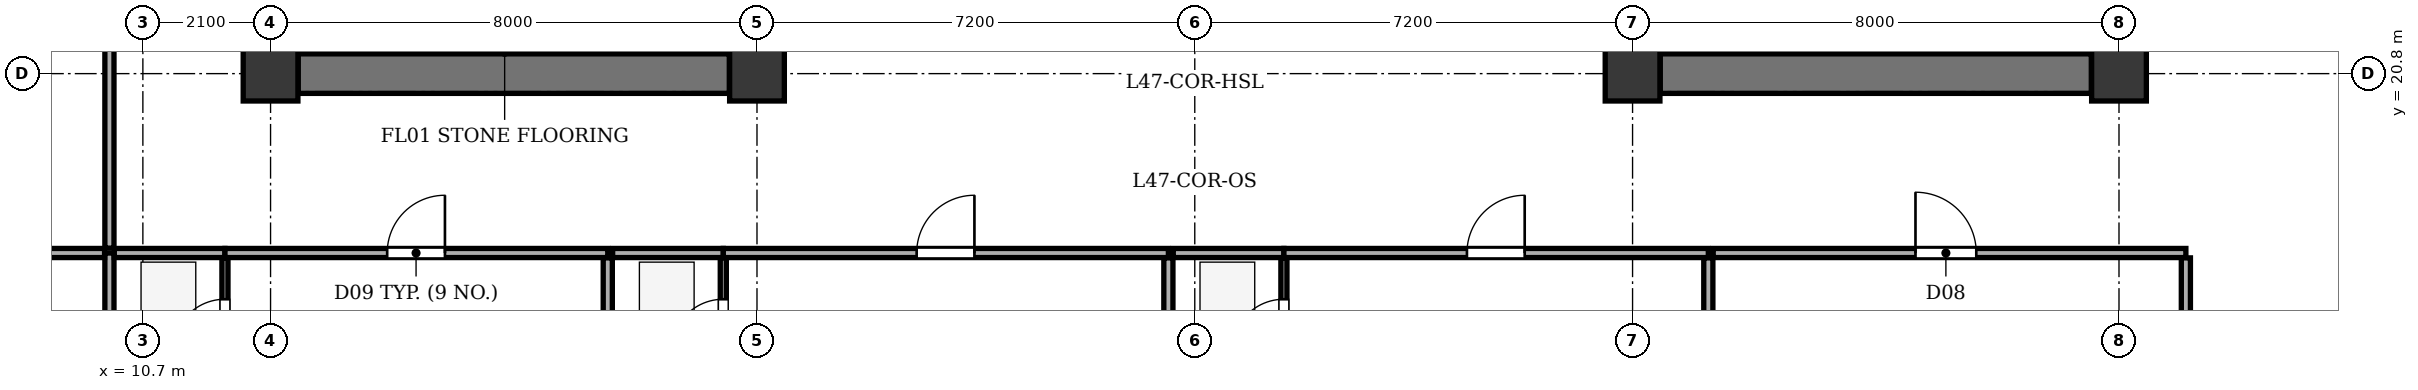
"""IFC4 building model, lengths in metres.
Left out: names, types, materials, properties, quantities, classifications, styles, units other than length and angle.
Written with IfcOpenShell. Run it as: python <this file> out.ifc"""

import sys

from ifc_helpers import new_model, si_unit, direction, frame, frame_2d, origin, origin_2d, place, context, subcontext, project, spatial, rectangle, extrude, element, fill, save


model = new_model("IFC4")
c1 = context("Model", 3, precision=1e-05, world=origin(), true_north=direction((0.0, 1.0)))
c2 = subcontext(c1, "Body", "Model", "MODEL_VIEW")
j1 = project(units=[si_unit("LENGTHUNIT", "METRE"), si_unit("PLANEANGLEUNIT", "RADIAN")], contexts=[c1])
p1 = place(None, origin())
s1 = spatial("IfcSite", under=j1, at=p1, CompositionType="ELEMENT")
p2 = place(p1, origin())
s2 = spatial("IfcBuilding", under=s1, at=p2, CompositionType="ELEMENT")
p3 = place(p2, frame((0.0, 0.0, 183.3)))
s3 = spatial("IfcBuildingStorey", under=s2, at=p3, CompositionType="ELEMENT", Elevation=183.3)
for number, where, z_axis, x_axis in (
    (1, (12.8, 20.8, 0.0), (0.0, 0.0, 1.0), (1.0, 0.0, 0.0)),
    (2, (20.8, 20.8, 0.0), (0.0, 0.0, 1.0), (1.0, 0.0, 0.0)),
    (3, (35.2, 20.8, 0.0), (0.0, 0.0, 1.0), (1.0, 0.0, 0.0)),
    (4, (43.2, 20.8, 0.0), (0.0, 0.0, 1.0), (1.0, 0.0, 0.0)),
):
    element("IfcColumn", number, at=place(p3, frame(where, z_axis=z_axis, x_axis=x_axis)), inside=s3, PredefinedType="COLUMN", context=c2, shape_type="SweptSolid", body=[
        extrude(rectangle(XDim=0.9, YDim=0.9, at=origin_2d()), origin(), (0.0, 0.0, 1.0), 3.5),
    ])
p4 = place(p3, frame((13.255, 20.8, 0.0), z_axis=(0.0, 0.0, 1.0), x_axis=(1.0, 0.0, 0.0)))
e5 = element("IfcWall", 5, at=p4, inside=s3, PredefinedType="SHEAR", context=c2, shape_type="SweptSolid", body=[
    extrude(rectangle(XDim=7.09, YDim=0.65, at=frame_2d((3.545, 0.0))), origin(), (0.0, 0.0, 1.0), 3.2),
])
p5 = place(p3, frame((16.435, 21.135, 0.0), z_axis=(0.0, 0.0, 1.0), x_axis=(0.0, 1.0, 0.0)))
e6 = element("IfcWall", 6, at=p5, inside=s3, PredefinedType="SHEAR", context=c2, shape_type="SweptSolid", body=[
    extrude(rectangle(XDim=12.13, YDim=0.25, at=frame_2d((6.065, 0.0))), origin(), (0.0, 0.0, 1.0), 3.2),
])
p6 = place(p5, frame((0.515, 0.0, 0.0)))
e7 = element("IfcOpeningElement", 7, at=p6, cuts=e6, PredefinedType="OPENING", context=c2, shape_type="SweptSolid", body=[
    extrude(rectangle(XDim=1.2, YDim=2.15, at=frame_2d((0.6, 1.075))), frame((0.0, 0.135, 0.0), z_axis=(0.0, -1.0, 0.0), x_axis=(1.0, 0.0, 0.0)), (0.0, 0.0, 1.0), 0.27),
])
p7 = place(p5, frame((2.665, 0.0, 0.0)))
e8 = element("IfcOpeningElement", 8, at=p7, cuts=e6, PredefinedType="OPENING", context=c2, shape_type="SweptSolid", body=[
    extrude(rectangle(XDim=1.15, YDim=2.15, at=frame_2d((0.575, 1.075))), frame((0.0, 0.135, 0.0), z_axis=(0.0, -1.0, 0.0), x_axis=(1.0, 0.0, 0.0)), (0.0, 0.0, 1.0), 0.27),
])
p8 = place(p3, frame((35.655, 20.8, 0.0), z_axis=(0.0, 0.0, 1.0), x_axis=(1.0, 0.0, 0.0)))
e9 = element("IfcWall", 9, at=p8, inside=s3, PredefinedType="SHEAR", context=c2, shape_type="SweptSolid", body=[
    extrude(rectangle(XDim=7.09, YDim=0.65, at=frame_2d((3.545, 0.0))), origin(), (0.0, 0.0, 1.0), 3.2),
])
p9 = place(p3, frame((39.565, 21.135, 0.0), z_axis=(0.0, 0.0, 1.0), x_axis=(0.0, 1.0, 0.0)))
e10 = element("IfcWall", 10, at=p9, inside=s3, PredefinedType="SHEAR", context=c2, shape_type="SweptSolid", body=[
    extrude(rectangle(XDim=12.13, YDim=0.25, at=frame_2d((6.065, 0.0))), origin(), (0.0, 0.0, 1.0), 3.2),
])
p10 = place(p9, frame((0.515, 0.0, 0.0)))
e11 = element("IfcOpeningElement", 11, at=p10, cuts=e10, PredefinedType="OPENING", context=c2, shape_type="SweptSolid", body=[
    extrude(rectangle(XDim=1.2, YDim=2.15, at=frame_2d((0.6, 1.075))), frame((0.0, 0.135, 0.0), z_axis=(0.0, -1.0, 0.0), x_axis=(1.0, 0.0, 0.0)), (0.0, 0.0, 1.0), 0.27),
])
p11 = place(p9, frame((2.665, 0.0, 0.0)))
e12 = element("IfcOpeningElement", 12, at=p11, cuts=e10, PredefinedType="OPENING", context=c2, shape_type="SweptSolid", body=[
    extrude(rectangle(XDim=1.15, YDim=2.15, at=frame_2d((0.575, 1.075))), frame((0.0, 0.135, 0.0), z_axis=(0.0, -1.0, 0.0), x_axis=(1.0, 0.0, 0.0)), (0.0, 0.0, 1.0), 0.27),
])
p12 = place(p3, frame((10.15, 8.275, 0.0), z_axis=(0.0, 0.0, 1.0), x_axis=(0.0, 1.0, 0.0)))
e13 = element("IfcWall", 13, at=p12, inside=s3, PredefinedType="PARTITIONING", context=c2, shape_type="SweptSolid", body=[
    extrude(rectangle(XDim=9.575, YDim=0.15, at=frame_2d((4.788, 0.0))), origin(), (0.0, 0.0, 1.0), 3.2),
])
p13 = place(p3, frame((10.23, 17.85, 0.0), z_axis=(0.0, 0.0, 1.0), x_axis=(1.0, 0.0, 0.0)))
e14 = element("IfcWall", 14, at=p13, inside=s3, PredefinedType="PARTITIONING", context=c2, shape_type="SweptSolid", body=[
    extrude(rectangle(XDim=1.82, YDim=0.15, at=frame_2d((0.91, 0.0))), origin(), (0.0, 0.0, 1.0), 3.2),
])
p14 = place(p3, frame((12.05, 17.85, 0.0), z_axis=(0.0, 0.0, 1.0), x_axis=(1.0, 0.0, 0.0)))
e15 = element("IfcWall", 15, at=p14, inside=s3, PredefinedType="PARTITIONING", context=c2, shape_type="SweptSolid", body=[
    extrude(rectangle(XDim=6.296, YDim=0.15, at=frame_2d((3.148, 0.0))), origin(), (0.0, 0.0, 1.0), 3.2),
])
p15 = place(p14, frame((2.668, 0.0, 0.0)))
e16 = element("IfcOpeningElement", 16, at=p15, cuts=e15, PredefinedType="OPENING", context=c2, shape_type="SweptSolid", body=[
    extrude(rectangle(XDim=0.95, YDim=2.1, at=frame_2d((0.475, 1.05))), frame((0.0, 0.085, 0.0), z_axis=(0.0, -1.0, 0.0), x_axis=(1.0, 0.0, 0.0)), (0.0, 0.0, 1.0), 0.17),
])
p16 = place(p3, frame((12.05, 15.52, 0.0), z_axis=(0.0, 0.0, 1.0), x_axis=(0.0, 1.0, 0.0)))
e17 = element("IfcWall", 17, at=p16, inside=s3, PredefinedType="PARTITIONING", context=c2, shape_type="SweptSolid", body=[
    extrude(rectangle(XDim=2.25, YDim=0.1, at=frame_2d((1.125, 0.0))), origin(), (0.0, 0.0, 1.0), 3.2),
])
p17 = place(p16, frame((0.72, 0.0, 0.0)))
e18 = element("IfcOpeningElement", 18, at=p17, cuts=e17, PredefinedType="OPENING", context=c2, shape_type="SweptSolid", body=[
    extrude(rectangle(XDim=0.85, YDim=2.05, at=frame_2d((0.425, 1.025))), frame((0.0, 0.06, 0.0), z_axis=(0.0, -1.0, 0.0), x_axis=(1.0, 0.0, 0.0)), (0.0, 0.0, 1.0), 0.12),
])
p18 = place(p3, frame((18.346, 8.275, 0.0), z_axis=(0.0, 0.0, 1.0), x_axis=(0.0, 1.0, 0.0)))
e19 = element("IfcWall", 19, at=p18, inside=s3, PredefinedType="PARTITIONING", context=c2, shape_type="SweptSolid", body=[
    extrude(rectangle(XDim=9.495, YDim=0.15, at=frame_2d((4.748, 0.0))), origin(), (0.0, 0.0, 1.0), 3.2),
])
p19 = place(p3, frame((18.426, 17.85, 0.0), z_axis=(0.0, 0.0, 1.0), x_axis=(1.0, 0.0, 0.0)))
e20 = element("IfcWall", 20, at=p19, inside=s3, PredefinedType="PARTITIONING", context=c2, shape_type="SweptSolid", body=[
    extrude(rectangle(XDim=1.82, YDim=0.15, at=frame_2d((0.91, 0.0))), origin(), (0.0, 0.0, 1.0), 3.2),
])
p20 = place(p3, frame((20.246, 17.85, 0.0), z_axis=(0.0, 0.0, 1.0), x_axis=(1.0, 0.0, 0.0)))
e21 = element("IfcWall", 21, at=p20, inside=s3, PredefinedType="PARTITIONING", context=c2, shape_type="SweptSolid", body=[
    extrude(rectangle(XDim=7.32, YDim=0.15, at=frame_2d((3.66, 0.0))), origin(), (0.0, 0.0, 1.0), 3.2),
])
p21 = place(p20, frame((3.18, 0.0, 0.0)))
e22 = element("IfcOpeningElement", 22, at=p21, cuts=e21, PredefinedType="OPENING", context=c2, shape_type="SweptSolid", body=[
    extrude(rectangle(XDim=0.95, YDim=2.1, at=frame_2d((0.475, 1.05))), frame((0.0, 0.085, 0.0), z_axis=(0.0, -1.0, 0.0), x_axis=(1.0, 0.0, 0.0)), (0.0, 0.0, 1.0), 0.17),
])
p22 = place(p3, frame((20.246, 15.52, 0.0), z_axis=(0.0, 0.0, 1.0), x_axis=(0.0, 1.0, 0.0)))
e23 = element("IfcWall", 23, at=p22, inside=s3, PredefinedType="PARTITIONING", context=c2, shape_type="SweptSolid", body=[
    extrude(rectangle(XDim=2.25, YDim=0.1, at=frame_2d((1.125, 0.0))), origin(), (0.0, 0.0, 1.0), 3.2),
])
p23 = place(p22, frame((0.72, 0.0, 0.0)))
e24 = element("IfcOpeningElement", 24, at=p23, cuts=e23, PredefinedType="OPENING", context=c2, shape_type="SweptSolid", body=[
    extrude(rectangle(XDim=0.85, YDim=2.05, at=frame_2d((0.425, 1.025))), frame((0.0, 0.06, 0.0), z_axis=(0.0, -1.0, 0.0), x_axis=(1.0, 0.0, 0.0)), (0.0, 0.0, 1.0), 0.12),
])
p24 = place(p3, frame((27.566, 8.275, 0.0), z_axis=(0.0, 0.0, 1.0), x_axis=(0.0, 1.0, 0.0)))
e25 = element("IfcWall", 25, at=p24, inside=s3, PredefinedType="PARTITIONING", context=c2, shape_type="SweptSolid", body=[
    extrude(rectangle(XDim=9.495, YDim=0.15, at=frame_2d((4.748, 0.0))), origin(), (0.0, 0.0, 1.0), 3.2),
])
p25 = place(p3, frame((27.646, 17.85, 0.0), z_axis=(0.0, 0.0, 1.0), x_axis=(1.0, 0.0, 0.0)))
e26 = element("IfcWall", 26, at=p25, inside=s3, PredefinedType="PARTITIONING", context=c2, shape_type="SweptSolid", body=[
    extrude(rectangle(XDim=1.82, YDim=0.15, at=frame_2d((0.91, 0.0))), origin(), (0.0, 0.0, 1.0), 3.2),
])
p26 = place(p3, frame((29.466, 17.85, 0.0), z_axis=(0.0, 0.0, 1.0), x_axis=(1.0, 0.0, 0.0)))
e27 = element("IfcWall", 27, at=p26, inside=s3, PredefinedType="PARTITIONING", context=c2, shape_type="SweptSolid", body=[
    extrude(rectangle(XDim=6.98, YDim=0.15, at=frame_2d((3.49, 0.0))), origin(), (0.0, 0.0, 1.0), 3.2),
])
p27 = place(p26, frame((3.01, 0.0, 0.0)))
e28 = element("IfcOpeningElement", 28, at=p27, cuts=e27, PredefinedType="OPENING", context=c2, shape_type="SweptSolid", body=[
    extrude(rectangle(XDim=0.95, YDim=2.1, at=frame_2d((0.475, 1.05))), frame((0.0, 0.085, 0.0), z_axis=(0.0, -1.0, 0.0), x_axis=(1.0, 0.0, 0.0)), (0.0, 0.0, 1.0), 0.17),
])
p28 = place(p3, frame((29.466, 15.52, 0.0), z_axis=(0.0, 0.0, 1.0), x_axis=(0.0, 1.0, 0.0)))
e29 = element("IfcWall", 29, at=p28, inside=s3, PredefinedType="PARTITIONING", context=c2, shape_type="SweptSolid", body=[
    extrude(rectangle(XDim=2.25, YDim=0.1, at=frame_2d((1.125, 0.0))), origin(), (0.0, 0.0, 1.0), 3.2),
])
p29 = place(p28, frame((0.72, 0.0, 0.0)))
e30 = element("IfcOpeningElement", 30, at=p29, cuts=e29, PredefinedType="OPENING", context=c2, shape_type="SweptSolid", body=[
    extrude(rectangle(XDim=0.85, YDim=2.05, at=frame_2d((0.425, 1.025))), frame((0.0, 0.06, 0.0), z_axis=(0.0, -1.0, 0.0), x_axis=(1.0, 0.0, 0.0)), (0.0, 0.0, 1.0), 0.12),
])
p30 = place(p3, frame((36.446, 8.275, 0.0), z_axis=(0.0, 0.0, 1.0), x_axis=(0.0, 1.0, 0.0)))
e31 = element("IfcWall", 31, at=p30, inside=s3, PredefinedType="PARTITIONING", context=c2, shape_type="SweptSolid", body=[
    extrude(rectangle(XDim=9.495, YDim=0.15, at=frame_2d((4.748, 0.0))), origin(), (0.0, 0.0, 1.0), 3.2),
])
p31 = place(p3, frame((36.526, 17.85, 0.0), z_axis=(0.0, 0.0, 1.0), x_axis=(1.0, 0.0, 0.0)))
e32 = element("IfcWall", 32, at=p31, inside=s3, PredefinedType="PARTITIONING", context=c2, shape_type="SweptSolid", body=[
    extrude(rectangle(XDim=7.774, YDim=0.15, at=frame_2d((3.887, 0.0))), origin(), (0.0, 0.0, 1.0), 3.2),
])
p32 = place(p31, frame((3.327, 0.0, 0.0)))
e33 = element("IfcOpeningElement", 33, at=p32, cuts=e32, PredefinedType="OPENING", context=c2, shape_type="SweptSolid", body=[
    extrude(rectangle(XDim=1.0, YDim=2.1, at=frame_2d((0.5, 1.05))), frame((0.0, 0.085, 0.0), z_axis=(0.0, -1.0, 0.0), x_axis=(1.0, 0.0, 0.0)), (0.0, 0.0, 1.0), 0.17),
])
p33 = place(p3, frame((44.3, 8.275, 0.0), z_axis=(0.0, 0.0, 1.0), x_axis=(0.0, 1.0, 0.0)))
e34 = element("IfcWall", 34, at=p33, inside=s3, PredefinedType="PARTITIONING", context=c2, shape_type="SweptSolid", body=[
    extrude(rectangle(XDim=9.495, YDim=0.15, at=frame_2d((4.748, 0.0))), origin(), (0.0, 0.0, 1.0), 3.2),
])
p34 = place(p3, frame((4.675, 17.85, 0.0), z_axis=(0.0, 0.0, 1.0), x_axis=(1.0, 0.0, 0.0)))
e35 = element("IfcWall", 35, at=p34, inside=s3, PredefinedType="PARTITIONING", context=c2, shape_type="SweptSolid", body=[
    extrude(rectangle(XDim=5.395, YDim=0.15, at=frame_2d((2.698, 0.0))), origin(), (0.0, 0.0, 1.0), 3.2),
])
p35 = place(p3, frame((10.15, 17.93, 0.0), z_axis=(0.0, 0.0, 1.0), x_axis=(0.0, 1.0, 0.0)))
e36 = element("IfcWall", 36, at=p35, inside=s3, PredefinedType="PARTITIONING", context=c2, shape_type="SweptSolid", body=[
    extrude(rectangle(XDim=18.54, YDim=0.15, at=frame_2d((9.27, 0.0))), origin(), (0.0, 0.0, 1.0), 3.2),
])
p36 = place(p35, frame((8.79, 0.0, 0.0)))
e37 = element("IfcOpeningElement", 37, at=p36, cuts=e36, PredefinedType="OPENING", context=c2, shape_type="SweptSolid", body=[
    extrude(rectangle(XDim=0.95, YDim=2.1, at=frame_2d((0.475, 1.05))), frame((0.0, 0.085, 0.0), z_axis=(0.0, -1.0, 0.0), x_axis=(1.0, 0.0, 0.0)), (0.0, 0.0, 1.0), 0.17),
])
p37 = place(p17, origin())
e38 = element("IfcDoor", 38, at=p37, inside=s3, OperationType="SINGLE_SWING_LEFT", PredefinedType="DOOR", context=c2, shape_type="SweptSolid", body=[
    extrude(rectangle(XDim=0.85, YDim=2.05, at=frame_2d((0.425, 1.025))), frame((0.0, 0.025, 0.0), z_axis=(0.0, -1.0, 0.0), x_axis=(1.0, 0.0, 0.0)), (0.0, 0.0, 1.0), 0.05),
])
fill(e18, e38)
p38 = place(p15, origin())
e39 = element("IfcDoor", 39, at=p38, inside=s3, OperationType="SINGLE_SWING_RIGHT", PredefinedType="DOOR", context=c2, shape_type="SweptSolid", body=[
    extrude(rectangle(XDim=0.95, YDim=2.1, at=frame_2d((0.475, 1.05))), frame((0.0, 0.025, 0.0), z_axis=(0.0, -1.0, 0.0), x_axis=(1.0, 0.0, 0.0)), (0.0, 0.0, 1.0), 0.05),
])
fill(e16, e39)
p39 = place(p23, origin())
e40 = element("IfcDoor", 40, at=p39, inside=s3, OperationType="SINGLE_SWING_LEFT", PredefinedType="DOOR", context=c2, shape_type="SweptSolid", body=[
    extrude(rectangle(XDim=0.85, YDim=2.05, at=frame_2d((0.425, 1.025))), frame((0.0, 0.025, 0.0), z_axis=(0.0, -1.0, 0.0), x_axis=(1.0, 0.0, 0.0)), (0.0, 0.0, 1.0), 0.05),
])
fill(e24, e40)
p40 = place(p21, origin())
e41 = element("IfcDoor", 41, at=p40, inside=s3, OperationType="SINGLE_SWING_RIGHT", PredefinedType="DOOR", context=c2, shape_type="SweptSolid", body=[
    extrude(rectangle(XDim=0.95, YDim=2.1, at=frame_2d((0.475, 1.05))), frame((0.0, 0.025, 0.0), z_axis=(0.0, -1.0, 0.0), x_axis=(1.0, 0.0, 0.0)), (0.0, 0.0, 1.0), 0.05),
])
fill(e22, e41)
p41 = place(p29, origin())
e42 = element("IfcDoor", 42, at=p41, inside=s3, OperationType="SINGLE_SWING_LEFT", PredefinedType="DOOR", context=c2, shape_type="SweptSolid", body=[
    extrude(rectangle(XDim=0.85, YDim=2.05, at=frame_2d((0.425, 1.025))), frame((0.0, 0.025, 0.0), z_axis=(0.0, -1.0, 0.0), x_axis=(1.0, 0.0, 0.0)), (0.0, 0.0, 1.0), 0.05),
])
fill(e30, e42)
p42 = place(p27, origin())
e43 = element("IfcDoor", 43, at=p42, inside=s3, OperationType="SINGLE_SWING_RIGHT", PredefinedType="DOOR", context=c2, shape_type="SweptSolid", body=[
    extrude(rectangle(XDim=0.95, YDim=2.1, at=frame_2d((0.475, 1.05))), frame((0.0, 0.025, 0.0), z_axis=(0.0, -1.0, 0.0), x_axis=(1.0, 0.0, 0.0)), (0.0, 0.0, 1.0), 0.05),
])
fill(e28, e43)
p43 = place(p32, origin())
e44 = element("IfcDoor", 44, at=p43, inside=s3, OperationType="SINGLE_SWING_LEFT", PredefinedType="DOOR", context=c2, shape_type="SweptSolid", body=[
    extrude(rectangle(XDim=1.0, YDim=2.1, at=frame_2d((0.5, 1.05))), frame((0.0, 0.025, 0.0), z_axis=(0.0, -1.0, 0.0), x_axis=(1.0, 0.0, 0.0)), (0.0, 0.0, 1.0), 0.05),
])
fill(e33, e44)
save(model, sys.argv[1])
